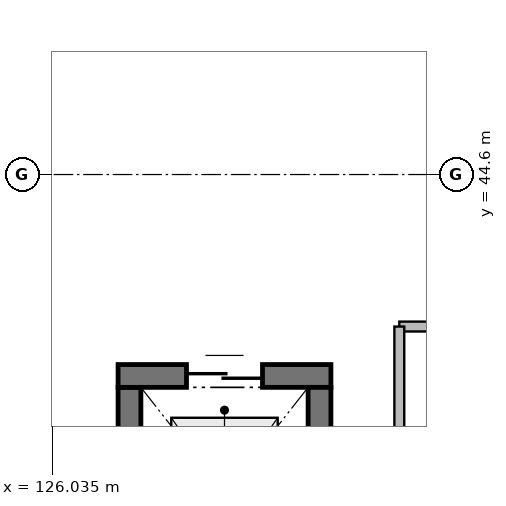
"""IFC4 building model, lengths in metres.
Left out: names, types, materials, properties, quantities, classifications, styles, units other than length and angle.
Written with IfcOpenShell. Run it as: python <this file> out.ifc"""

import sys

from ifc_helpers import new_model, si_unit, direction, frame, frame_2d, origin, place, context, subcontext, project, spatial, rectangle, extrude, element, fill, save


model = new_model("IFC4")
c1 = context("Model", 3, precision=1e-05, world=origin(), true_north=direction((0.0, 1.0)))
c2 = subcontext(c1, "Body", "Model", "MODEL_VIEW")
j1 = project(units=[si_unit("LENGTHUNIT", "METRE"), si_unit("PLANEANGLEUNIT", "RADIAN")], contexts=[c1])
p1 = place(None, origin())
s1 = spatial("IfcSite", under=j1, at=p1, CompositionType="ELEMENT")
p2 = place(p1, origin())
s2 = spatial("IfcBuilding", under=s1, at=p2, CompositionType="ELEMENT")
p3 = place(p2, origin())
s3 = spatial("IfcBuildingStorey", under=s2, at=p3, CompositionType="ELEMENT", Elevation=0.0)
p4 = place(p3, frame((127.05, 39.0, 0.0), z_axis=(0.0, 0.0, 1.0), x_axis=(0.0, 1.0, 0.0)))
e1 = element("IfcWall", 1, at=p4, inside=s3, PredefinedType="SOLIDWALL", context=c2, shape_type="SweptSolid", body=[
    extrude(rectangle(XDim=2.8, YDim=0.3, at=frame_2d((1.4, 0.0))), origin(), (0.0, 0.0, 1.0), 4.8),
])
p5 = place(p3, frame((126.9, 41.95, 0.0), z_axis=(0.0, 0.0, 1.0), x_axis=(1.0, 0.0, 0.0)))
e2 = element("IfcWall", 2, at=p5, inside=s3, PredefinedType="SOLIDWALL", context=c2, shape_type="SweptSolid", body=[
    extrude(rectangle(XDim=2.8, YDim=0.3, at=frame_2d((1.4, 0.0))), origin(), (0.0, 0.0, 1.0), 4.8),
])
p6 = place(p5, frame((0.9, 0.0, 0.0)))
e3 = element("IfcOpeningElement", 3, at=p6, cuts=e2, PredefinedType="OPENING", context=c2, shape_type="SweptSolid", body=[
    extrude(rectangle(XDim=1.0, YDim=2.15, at=frame_2d((0.5, 1.075))), frame((0.0, 0.17, 0.0), z_axis=(0.0, -1.0, 0.0), x_axis=(1.0, 0.0, 0.0)), (0.0, 0.0, 1.0), 0.34),
])
p7 = place(p3, frame((129.55, 41.8, 0.0), z_axis=(0.0, 0.0, 1.0), x_axis=(0.0, -1.0, 0.0)))
e4 = element("IfcWall", 4, at=p7, inside=s3, PredefinedType="SOLIDWALL", context=c2, shape_type="SweptSolid", body=[
    extrude(rectangle(XDim=2.8, YDim=0.3, at=frame_2d((1.4, 0.0))), origin(), (0.0, 0.0, 1.0), 4.8),
])
p8 = place(p3, frame((130.6, 42.6, 0.0), z_axis=(0.0, 0.0, 1.0), x_axis=(1.0, 0.0, 0.0)))
e5 = element("IfcWall", 5, at=p8, inside=s3, PredefinedType="PARTITIONING", context=c2, shape_type="SweptSolid", body=[
    extrude(rectangle(XDim=14.4, YDim=0.13, at=frame_2d((7.2, 0.0))), origin(), (0.0, 0.0, 1.0), 4.54),
])
p9 = place(p8, frame((6.72, 0.0, 0.0)))
e6 = element("IfcOpeningElement", 6, at=p9, cuts=e5, PredefinedType="OPENING", context=c2, shape_type="SweptSolid", body=[
    extrude(rectangle(XDim=1.45, YDim=2.2, at=frame_2d((0.725, 1.1))), frame((0.0, 0.085, 0.0), z_axis=(0.0, -1.0, 0.0), x_axis=(1.0, 0.0, 0.0)), (0.0, 0.0, 1.0), 0.17),
])
p10 = place(p3, frame((130.6, 24.0, 0.0), z_axis=(0.0, 0.0, 1.0), x_axis=(0.0, 1.0, 0.0)))
e7 = element("IfcWall", 7, at=p10, inside=s3, PredefinedType="PARTITIONING", context=c2, shape_type="SweptSolid", body=[
    extrude(rectangle(XDim=18.6, YDim=0.13, at=frame_2d((9.3, 0.0))), origin(), (0.0, 0.0, 1.0), 4.54),
])
p11 = place(p6, origin())
e8 = element("IfcDoor", 8, at=p11, inside=s3, OperationType="DOUBLE_DOOR_SLIDING", PredefinedType="DOOR", context=c2, shape_type="SweptSolid", body=[
    extrude(rectangle(XDim=1.0, YDim=2.15, at=frame_2d((0.5, 1.075))), frame((0.0, 0.025, 0.0), z_axis=(0.0, -1.0, 0.0), x_axis=(1.0, 0.0, 0.0)), (0.0, 0.0, 1.0), 0.05),
])
fill(e3, e8)
save(model, sys.argv[1])
